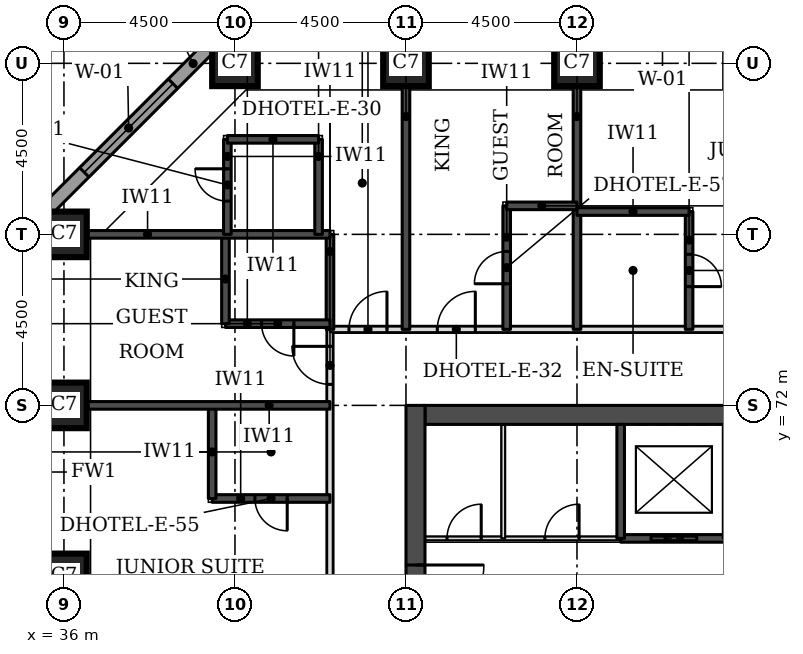
"""IFC4 building model, lengths in metres.
Left out: names, types, materials, properties, quantities, classifications, styles, units other than length and angle.
Written with IfcOpenShell. Run it as: python <this file> out.ifc"""

import sys

from ifc_helpers import new_model, si_unit, direction, frame, frame_2d, origin, origin_2d, place, context, subcontext, project, spatial, rectangle, extrude, element, fill, save


model = new_model("IFC4")
c1 = context("Model", 3, precision=1e-05, world=origin(), true_north=direction((0.0, 1.0)))
c2 = subcontext(c1, "Body", "Model", "MODEL_VIEW")
j1 = project(units=[si_unit("LENGTHUNIT", "METRE"), si_unit("PLANEANGLEUNIT", "RADIAN")], contexts=[c1])
p1 = place(None, origin())
s1 = spatial("IfcSite", under=j1, at=p1, CompositionType="ELEMENT")
p2 = place(p1, origin())
s2 = spatial("IfcBuilding", under=s1, at=p2, CompositionType="ELEMENT")
p3 = place(p2, frame((0.0, 0.0, 39.6)))
s3 = spatial("IfcBuildingStorey", under=s2, at=p3, CompositionType="ELEMENT", Elevation=39.6)
for number, where, z_axis, x_axis in (
    (1, (36.0, 67.5, 0.0), (0.0, 0.0, 1.0), (1.0, 0.0, 0.0)),
    (2, (36.0, 72.0, 0.0), (0.0, 0.0, 1.0), (1.0, 0.0, 0.0)),
    (3, (36.0, 76.5, 0.0), (0.0, 0.0, 1.0), (1.0, 0.0, 0.0)),
    (4, (40.5, 81.0, 0.0), (0.0, 0.0, 1.0), (1.0, 0.0, 0.0)),
    (5, (45.0, 81.0, 0.0), (0.0, 0.0, 1.0), (1.0, 0.0, 0.0)),
    (6, (49.5, 81.0, 0.0), (0.0, 0.0, 1.0), (1.0, 0.0, 0.0)),
):
    element("IfcColumn", number, at=place(p3, frame(where, z_axis=z_axis, x_axis=x_axis)), inside=s3, PredefinedType="COLUMN", context=c2, shape_type="SweptSolid", body=[
        extrude(rectangle(XDim=1.2, YDim=1.2, at=origin_2d()), origin(), (0.0, 0.0, 1.0), 3.3),
    ])
p4 = place(p3, frame((45.5, 71.75, 0.0), z_axis=(0.0, 0.0, 1.0), x_axis=(1.0, 0.0, 0.0)))
e7 = element("IfcWall", 7, at=p4, inside=s3, PredefinedType="SHEAR", context=c2, shape_type="SweptSolid", body=[
    extrude(rectangle(XDim=21.5, YDim=0.5, at=frame_2d((10.75, 0.0))), origin(), (0.0, 0.0, 1.0), 3.3),
])
p5 = place(p3, frame((45.25, 49.5, 0.0), z_axis=(0.0, 0.0, 1.0), x_axis=(0.0, 1.0, 0.0)))
e8 = element("IfcWall", 8, at=p5, inside=s3, PredefinedType="SHEAR", context=c2, shape_type="SweptSolid", body=[
    extrude(rectangle(XDim=22.5, YDim=0.5, at=frame_2d((11.25, 0.0))), origin(), (0.0, 0.0, 1.0), 3.3),
])
p6 = place(p5, frame((4.2, 0.0, 0.0)))
e9 = element("IfcOpeningElement", 9, at=p6, cuts=e8, PredefinedType="OPENING", context=c2, shape_type="SweptSolid", body=[
    extrude(rectangle(XDim=1.8, YDim=2.1, at=frame_2d((0.9, 1.05))), frame((0.0, 0.26, 0.0), z_axis=(0.0, -1.0, 0.0), x_axis=(1.0, 0.0, 0.0)), (0.0, 0.0, 1.0), 0.52),
])
p7 = place(p5, frame((6.9, 0.0, 0.0)))
e10 = element("IfcOpeningElement", 10, at=p7, cuts=e8, PredefinedType="OPENING", context=c2, shape_type="SweptSolid", body=[
    extrude(rectangle(XDim=1.1, YDim=2.1, at=frame_2d((0.55, 1.05))), frame((0.0, 0.26, 0.0), z_axis=(0.0, -1.0, 0.0), x_axis=(1.0, 0.0, 0.0)), (0.0, 0.0, 1.0), 0.52),
])
p8 = place(p5, frame((13.6, 0.0, 0.0)))
e11 = element("IfcOpeningElement", 11, at=p8, cuts=e8, PredefinedType="OPENING", context=c2, shape_type="SweptSolid", body=[
    extrude(rectangle(XDim=1.1, YDim=2.1, at=frame_2d((0.55, 1.05))), frame((0.0, 0.26, 0.0), z_axis=(0.0, -1.0, 0.0), x_axis=(1.0, 0.0, 0.0)), (0.0, 0.0, 1.0), 0.52),
])
p9 = place(p5, frame((16.5, 0.0, 0.0)))
e12 = element("IfcOpeningElement", 12, at=p9, cuts=e8, PredefinedType="OPENING", context=c2, shape_type="SweptSolid", body=[
    extrude(rectangle(XDim=1.8, YDim=2.1, at=frame_2d((0.9, 1.05))), frame((0.0, 0.26, 0.0), z_axis=(0.0, -1.0, 0.0), x_axis=(1.0, 0.0, 0.0)), (0.0, 0.0, 1.0), 0.52),
])
p10 = place(p3, frame((40.23, 81.826, 0.0), z_axis=(0.0, 0.0, 1.0), x_axis=(-0.707106781187, -0.707106781187, 0.0)))
e13 = element("IfcWall", 13, at=p10, inside=s3, PredefinedType="STANDARD", context=c2, shape_type="SweptSolid", body=[
    extrude(rectangle(XDim=7.151, YDim=0.35, at=frame_2d((3.576, 0.0))), origin(), (0.0, 0.0, 1.0), 3.055),
])
p11 = place(p10, frame((1.926, 0.0, 0.8)))
e14 = element("IfcOpeningElement", 14, at=p11, cuts=e13, PredefinedType="OPENING", context=c2, shape_type="SweptSolid", body=[
    extrude(rectangle(XDim=3.3, YDim=1.5, at=frame_2d((1.65, 0.75))), frame((0.0, 0.185, 0.0), z_axis=(0.0, -1.0, 0.0), x_axis=(1.0, 0.0, 0.0)), (0.0, 0.0, 1.0), 0.37),
])
p12 = place(p3, frame((43.0, 57.35, 0.0), z_axis=(0.0, 0.0, 1.0), x_axis=(0.0, 1.0, 0.0)))
e15 = element("IfcWall", 15, at=p12, inside=s3, PredefinedType="PARTITIONING", context=c2, shape_type="SweptSolid", body=[
    extrude(rectangle(XDim=16.65, YDim=0.15, at=frame_2d((8.325, 0.0))), origin(), (0.0, 0.0, 1.0), 3.08),
])
p13 = place(p12, frame((8.425, 0.0, 0.0)))
e16 = element("IfcOpeningElement", 16, at=p13, cuts=e15, PredefinedType="OPENING", context=c2, shape_type="SweptSolid", body=[
    extrude(rectangle(XDim=1.0, YDim=2.1, at=frame_2d((0.5, 1.05))), frame((0.0, 0.085, 0.0), z_axis=(0.0, -1.0, 0.0), x_axis=(1.0, 0.0, 0.0)), (0.0, 0.0, 1.0), 0.17),
])
p14 = place(p12, frame((15.203, 0.0, 0.0)))
e17 = element("IfcOpeningElement", 17, at=p14, cuts=e15, PredefinedType="OPENING", context=c2, shape_type="SweptSolid", body=[
    extrude(rectangle(XDim=1.0, YDim=2.1, at=frame_2d((0.5, 1.05))), frame((0.0, 0.085, 0.0), z_axis=(0.0, -1.0, 0.0), x_axis=(1.0, 0.0, 0.0)), (0.0, 0.0, 1.0), 0.17),
])
p15 = place(p3, frame((43.0, 74.0, 0.0), z_axis=(0.0, 0.0, 1.0), x_axis=(1.0, 0.0, 0.0)))
e18 = element("IfcWall", 18, at=p15, inside=s3, PredefinedType="PARTITIONING", context=c2, shape_type="SweptSolid", body=[
    extrude(rectangle(XDim=26.5, YDim=0.15, at=frame_2d((13.25, 0.0))), origin(), (0.0, 0.0, 1.0), 3.08),
])
p16 = place(p15, frame((2.825, 0.0, 0.0)))
e19 = element("IfcOpeningElement", 19, at=p16, cuts=e18, PredefinedType="OPENING", context=c2, shape_type="SweptSolid", body=[
    extrude(rectangle(XDim=1.0, YDim=2.1, at=frame_2d((0.5, 1.05))), frame((0.0, 0.085, 0.0), z_axis=(0.0, -1.0, 0.0), x_axis=(1.0, 0.0, 0.0)), (0.0, 0.0, 1.0), 0.17),
])
p17 = place(p15, frame((11.975, 0.0, 0.0)))
e20 = element("IfcOpeningElement", 20, at=p17, cuts=e18, PredefinedType="OPENING", context=c2, shape_type="SweptSolid", body=[
    extrude(rectangle(XDim=1.0, YDim=2.1, at=frame_2d((0.5, 1.05))), frame((0.0, 0.085, 0.0), z_axis=(0.0, -1.0, 0.0), x_axis=(1.0, 0.0, 0.0)), (0.0, 0.0, 1.0), 0.17),
])
p18 = place(p15, frame((18.275, 0.0, 0.0)))
e21 = element("IfcOpeningElement", 21, at=p18, cuts=e18, PredefinedType="OPENING", context=c2, shape_type="SweptSolid", body=[
    extrude(rectangle(XDim=1.0, YDim=2.1, at=frame_2d((0.5, 1.05))), frame((0.0, 0.085, 0.0), z_axis=(0.0, -1.0, 0.0), x_axis=(1.0, 0.0, 0.0)), (0.0, 0.0, 1.0), 0.17),
])
p19 = place(p15, frame((0.5, 0.0, 0.0)))
e22 = element("IfcOpeningElement", 22, at=p19, cuts=e18, PredefinedType="OPENING", context=c2, shape_type="SweptSolid", body=[
    extrude(rectangle(XDim=1.0, YDim=2.1, at=frame_2d((0.5, 1.05))), frame((0.0, 0.085, 0.0), z_axis=(0.0, -1.0, 0.0), x_axis=(1.0, 0.0, 0.0)), (0.0, 0.0, 1.0), 0.17),
])
p20 = place(p15, frame((25.0, 0.0, 0.0)))
e23 = element("IfcOpeningElement", 23, at=p20, cuts=e18, PredefinedType="OPENING", context=c2, shape_type="SweptSolid", body=[
    extrude(rectangle(XDim=1.0, YDim=2.1, at=frame_2d((0.5, 1.05))), frame((0.0, 0.085, 0.0), z_axis=(0.0, -1.0, 0.0), x_axis=(1.0, 0.0, 0.0)), (0.0, 0.0, 1.0), 0.17),
])
p21 = place(p3, frame((39.9, 69.55, 0.0), z_axis=(0.0, 0.0, 1.0), x_axis=(1.0, 0.0, 0.0)))
e24 = element("IfcWall", 24, at=p21, inside=s3, PredefinedType="SOLIDWALL", context=c2, shape_type="SweptSolid", body=[
    extrude(rectangle(XDim=3.1, YDim=0.2, at=frame_2d((1.55, 0.0))), origin(), (0.0, 0.0, 1.0), 3.08),
])
p22 = place(p21, frame((1.125, 0.0, 0.0)))
e25 = element("IfcOpeningElement", 25, at=p22, cuts=e24, PredefinedType="OPENING", context=c2, shape_type="SweptSolid", body=[
    extrude(rectangle(XDim=0.85, YDim=2.1, at=frame_2d((0.425, 1.05))), frame((0.0, 0.11, 0.0), z_axis=(0.0, -1.0, 0.0), x_axis=(1.0, 0.0, 0.0)), (0.0, 0.0, 1.0), 0.22),
])
p23 = place(p3, frame((39.9, 69.55, 0.0), z_axis=(0.0, 0.0, 1.0), x_axis=(0.0, 1.0, 0.0)))
e26 = element("IfcWall", 26, at=p23, inside=s3, PredefinedType="SOLIDWALL", context=c2, shape_type="SweptSolid", body=[
    extrude(rectangle(XDim=2.45, YDim=0.2, at=frame_2d((1.225, 0.0))), origin(), (0.0, 0.0, 1.0), 3.08),
])
p24 = place(p3, frame((36.6, 72.0, 0.0), z_axis=(0.0, 0.0, 1.0), x_axis=(1.0, 0.0, 0.0)))
e27 = element("IfcWall", 27, at=p24, inside=s3, PredefinedType="SOLIDWALL", context=c2, shape_type="SweptSolid", body=[
    extrude(rectangle(XDim=6.4, YDim=0.2, at=frame_2d((3.2, 0.0))), origin(), (0.0, 0.0, 1.0), 3.08),
])
p25 = place(p3, frame((43.0, 74.0, 0.0), z_axis=(0.0, 0.0, 1.0), x_axis=(0.0, 1.0, 0.0)))
e28 = element("IfcWall", 28, at=p25, inside=s3, PredefinedType="SOLIDWALL", context=c2, shape_type="SweptSolid", body=[
    extrude(rectangle(XDim=2.5, YDim=0.2, at=frame_2d((1.25, 0.0))), origin(), (0.0, 0.0, 1.0), 3.08),
])
p26 = place(p3, frame((45.0, 74.0, 0.0), z_axis=(0.0, 0.0, 1.0), x_axis=(0.0, 1.0, 0.0)))
e29 = element("IfcWall", 29, at=p26, inside=s3, PredefinedType="SOLIDWALL", context=c2, shape_type="SweptSolid", body=[
    extrude(rectangle(XDim=6.4, YDim=0.2, at=frame_2d((3.2, 0.0))), origin(), (0.0, 0.0, 1.0), 3.08),
])
p27 = place(p3, frame((47.65, 74.0, 0.0), z_axis=(0.0, 0.0, 1.0), x_axis=(0.0, 1.0, 0.0)))
e30 = element("IfcWall", 30, at=p27, inside=s3, PredefinedType="SOLIDWALL", context=c2, shape_type="SweptSolid", body=[
    extrude(rectangle(XDim=3.25, YDim=0.2, at=frame_2d((1.625, 0.0))), origin(), (0.0, 0.0, 1.0), 3.08),
])
p28 = place(p27, frame((1.2, 0.0, 0.0)))
e31 = element("IfcOpeningElement", 31, at=p28, cuts=e30, PredefinedType="OPENING", context=c2, shape_type="SweptSolid", body=[
    extrude(rectangle(XDim=0.85, YDim=2.1, at=frame_2d((0.425, 1.05))), frame((0.0, 0.11, 0.0), z_axis=(0.0, -1.0, 0.0), x_axis=(1.0, 0.0, 0.0)), (0.0, 0.0, 1.0), 0.22),
])
p29 = place(p3, frame((49.5, 74.0, 0.0), z_axis=(0.0, 0.0, 1.0), x_axis=(0.0, 1.0, 0.0)))
e32 = element("IfcWall", 32, at=p29, inside=s3, PredefinedType="SOLIDWALL", context=c2, shape_type="SweptSolid", body=[
    extrude(rectangle(XDim=6.4, YDim=0.2, at=frame_2d((3.2, 0.0))), origin(), (0.0, 0.0, 1.0), 3.08),
])
p30 = place(p3, frame((52.45, 74.0, 0.0), z_axis=(0.0, 0.0, 1.0), x_axis=(0.0, 1.0, 0.0)))
e33 = element("IfcWall", 33, at=p30, inside=s3, PredefinedType="SOLIDWALL", context=c2, shape_type="SweptSolid", body=[
    extrude(rectangle(XDim=3.1, YDim=0.2, at=frame_2d((1.55, 0.0))), origin(), (0.0, 0.0, 1.0), 3.08),
])
p31 = place(p30, frame((1.125, 0.0, 0.0)))
e34 = element("IfcOpeningElement", 34, at=p31, cuts=e33, PredefinedType="OPENING", context=c2, shape_type="SweptSolid", body=[
    extrude(rectangle(XDim=0.85, YDim=2.1, at=frame_2d((0.425, 1.05))), frame((0.0, 0.11, 0.0), z_axis=(0.0, -1.0, 0.0), x_axis=(1.0, 0.0, 0.0)), (0.0, 0.0, 1.0), 0.22),
])
p32 = place(p3, frame((40.25, 74.15, 0.0), z_axis=(0.0, 0.0, 1.0), x_axis=(1.0, 0.0, 0.0)))
e35 = element("IfcWall", 35, at=p32, inside=s3, PredefinedType="SOLIDWALL", context=c2, shape_type="SweptSolid", body=[
    extrude(rectangle(XDim=2.75, YDim=0.2, at=frame_2d((1.375, 0.0))), origin(), (0.0, 0.0, 1.0), 3.08),
])
p33 = place(p32, frame((0.95, 0.0, 0.0)))
e36 = element("IfcOpeningElement", 36, at=p33, cuts=e35, PredefinedType="OPENING", context=c2, shape_type="SweptSolid", body=[
    extrude(rectangle(XDim=0.85, YDim=2.1, at=frame_2d((0.425, 1.05))), frame((0.0, 0.11, 0.0), z_axis=(0.0, -1.0, 0.0), x_axis=(1.0, 0.0, 0.0)), (0.0, 0.0, 1.0), 0.22),
])
p34 = place(p3, frame((40.25, 74.15, 0.0), z_axis=(0.0, 0.0, 1.0), x_axis=(0.0, 1.0, 0.0)))
e37 = element("IfcWall", 37, at=p34, inside=s3, PredefinedType="SOLIDWALL", context=c2, shape_type="SweptSolid", body=[
    extrude(rectangle(XDim=2.35, YDim=0.2, at=frame_2d((1.175, 0.0))), origin(), (0.0, 0.0, 1.0), 3.08),
])
p35 = place(p3, frame((36.6, 76.5, 0.0), z_axis=(0.0, 0.0, 1.0), x_axis=(1.0, 0.0, 0.0)))
e38 = element("IfcWall", 38, at=p35, inside=s3, PredefinedType="SOLIDWALL", context=c2, shape_type="SweptSolid", body=[
    extrude(rectangle(XDim=6.4, YDim=0.2, at=frame_2d((3.2, 0.0))), origin(), (0.0, 0.0, 1.0), 3.08),
])
p36 = place(p3, frame((40.3, 76.5, 0.0), z_axis=(0.0, 0.0, 1.0), x_axis=(0.0, 1.0, 0.0)))
e39 = element("IfcWall", 39, at=p36, inside=s3, PredefinedType="SOLIDWALL", context=c2, shape_type="SweptSolid", body=[
    extrude(rectangle(XDim=2.5, YDim=0.2, at=frame_2d((1.25, 0.0))), origin(), (0.0, 0.0, 1.0), 3.08),
])
p37 = place(p36, frame((0.875, 0.0, 0.0)))
e40 = element("IfcOpeningElement", 40, at=p37, cuts=e39, PredefinedType="OPENING", context=c2, shape_type="SweptSolid", body=[
    extrude(rectangle(XDim=0.85, YDim=2.1, at=frame_2d((0.425, 1.05))), frame((0.0, 0.11, 0.0), z_axis=(0.0, -1.0, 0.0), x_axis=(1.0, 0.0, 0.0)), (0.0, 0.0, 1.0), 0.22),
])
p38 = place(p3, frame((42.7, 76.5, 0.0), z_axis=(0.0, 0.0, 1.0), x_axis=(0.0, 1.0, 0.0)))
e41 = element("IfcWall", 41, at=p38, inside=s3, PredefinedType="SOLIDWALL", context=c2, shape_type="SweptSolid", body=[
    extrude(rectangle(XDim=2.5, YDim=0.2, at=frame_2d((1.25, 0.0))), origin(), (0.0, 0.0, 1.0), 3.08),
])
p39 = place(p3, frame((49.5, 77.1, 0.0), z_axis=(0.0, 0.0, 1.0), x_axis=(1.0, 0.0, 0.0)))
e42 = element("IfcWall", 42, at=p39, inside=s3, PredefinedType="SOLIDWALL", context=c2, shape_type="SweptSolid", body=[
    extrude(rectangle(XDim=2.95, YDim=0.2, at=frame_2d((1.475, 0.0))), origin(), (0.0, 0.0, 1.0), 3.08),
])
p40 = place(p3, frame((47.65, 77.25, 0.0), z_axis=(0.0, 0.0, 1.0), x_axis=(1.0, 0.0, 0.0)))
e43 = element("IfcWall", 43, at=p40, inside=s3, PredefinedType="SOLIDWALL", context=c2, shape_type="SweptSolid", body=[
    extrude(rectangle(XDim=1.85, YDim=0.2, at=frame_2d((0.925, 0.0))), origin(), (0.0, 0.0, 1.0), 3.08),
])
p41 = place(p3, frame((40.3, 79.0, 0.0), z_axis=(0.0, 0.0, 1.0), x_axis=(1.0, 0.0, 0.0)))
e44 = element("IfcWall", 44, at=p41, inside=s3, PredefinedType="SOLIDWALL", context=c2, shape_type="SweptSolid", body=[
    extrude(rectangle(XDim=2.4, YDim=0.2, at=frame_2d((1.2, 0.0))), origin(), (0.0, 0.0, 1.0), 3.08),
])
p42 = place(p3, frame((45.5, 68.5, 0.0), z_axis=(0.0, 0.0, 1.0), x_axis=(1.0, 0.0, 0.0)))
e45 = element("IfcWall", 45, at=p42, inside=s3, PredefinedType="PARTITIONING", context=c2, shape_type="SweptSolid", body=[
    extrude(rectangle(XDim=5.15, YDim=0.1, at=frame_2d((2.575, 0.0))), origin(), (0.0, 0.0, 1.0), 3.08),
])
p43 = place(p42, frame((0.58, 0.0, 0.0)))
e46 = element("IfcOpeningElement", 46, at=p43, cuts=e45, PredefinedType="OPENING", context=c2, shape_type="SweptSolid", body=[
    extrude(rectangle(XDim=0.9, YDim=2.1, at=frame_2d((0.45, 1.05))), frame((0.0, 0.06, 0.0), z_axis=(0.0, -1.0, 0.0), x_axis=(1.0, 0.0, 0.0)), (0.0, 0.0, 1.0), 0.12),
])
p44 = place(p42, frame((3.155, 0.0, 0.0)))
e47 = element("IfcOpeningElement", 47, at=p44, cuts=e45, PredefinedType="OPENING", context=c2, shape_type="SweptSolid", body=[
    extrude(rectangle(XDim=0.9, YDim=2.1, at=frame_2d((0.45, 1.05))), frame((0.0, 0.06, 0.0), z_axis=(0.0, -1.0, 0.0), x_axis=(1.0, 0.0, 0.0)), (0.0, 0.0, 1.0), 0.12),
])
p45 = place(p3, frame((50.65, 68.5, 0.0), z_axis=(0.0, 0.0, 1.0), x_axis=(1.0, 0.0, 0.0)))
e48 = element("IfcWall", 48, at=p45, inside=s3, PredefinedType="SOLIDWALL", context=c2, shape_type="SweptSolid", body=[
    extrude(rectangle(XDim=11.2, YDim=0.2, at=frame_2d((5.6, 0.0))), origin(), (0.0, 0.0, 1.0), 3.08),
])
p46 = place(p45, frame((0.8, 0.0, 0.0)))
e49 = element("IfcOpeningElement", 49, at=p46, cuts=e48, PredefinedType="OPENING", context=c2, shape_type="SweptSolid", body=[
    extrude(rectangle(XDim=1.2, YDim=2.1, at=frame_2d((0.6, 1.05))), frame((0.0, 0.11, 0.0), z_axis=(0.0, -1.0, 0.0), x_axis=(1.0, 0.0, 0.0)), (0.0, 0.0, 1.0), 0.22),
])
p47 = place(p45, frame((3.6, 0.0, 0.0)))
e50 = element("IfcOpeningElement", 50, at=p47, cuts=e48, PredefinedType="OPENING", context=c2, shape_type="SweptSolid", body=[
    extrude(rectangle(XDim=1.2, YDim=2.1, at=frame_2d((0.6, 1.05))), frame((0.0, 0.11, 0.0), z_axis=(0.0, -1.0, 0.0), x_axis=(1.0, 0.0, 0.0)), (0.0, 0.0, 1.0), 0.22),
])
p48 = place(p45, frame((6.4, 0.0, 0.0)))
e51 = element("IfcOpeningElement", 51, at=p48, cuts=e48, PredefinedType="OPENING", context=c2, shape_type="SweptSolid", body=[
    extrude(rectangle(XDim=1.2, YDim=2.1, at=frame_2d((0.6, 1.05))), frame((0.0, 0.11, 0.0), z_axis=(0.0, -1.0, 0.0), x_axis=(1.0, 0.0, 0.0)), (0.0, 0.0, 1.0), 0.22),
])
p49 = place(p45, frame((9.2, 0.0, 0.0)))
e52 = element("IfcOpeningElement", 52, at=p49, cuts=e48, PredefinedType="OPENING", context=c2, shape_type="SweptSolid", body=[
    extrude(rectangle(XDim=1.2, YDim=2.1, at=frame_2d((0.6, 1.05))), frame((0.0, 0.11, 0.0), z_axis=(0.0, -1.0, 0.0), x_axis=(1.0, 0.0, 0.0)), (0.0, 0.0, 1.0), 0.22),
])
p50 = place(p3, frame((47.56, 68.5, 0.0), z_axis=(0.0, 0.0, 1.0), x_axis=(0.0, 1.0, 0.0)))
e53 = element("IfcWall", 53, at=p50, inside=s3, PredefinedType="PARTITIONING", context=c2, shape_type="SweptSolid", body=[
    extrude(rectangle(XDim=3.0, YDim=0.1, at=frame_2d((1.5, 0.0))), origin(), (0.0, 0.0, 1.0), 3.08),
])
for number, where, z_axis, x_axis in (
    (54, (50.65, 68.5, 0.0), (0.0, 0.0, 1.0), (0.0, 1.0, 0.0)),
    (55, (53.45, 68.5, 0.0), (0.0, 0.0, 1.0), (0.0, 1.0, 0.0)),
):
    element("IfcWall", number, at=place(p3, frame(where, z_axis=z_axis, x_axis=x_axis)), inside=s3, PredefinedType="SOLIDWALL", context=c2, shape_type="SweptSolid", body=[
        extrude(rectangle(XDim=3.0, YDim=0.2, at=frame_2d((1.5, 0.0))), origin(), (0.0, 0.0, 1.0), 3.08),
    ])
p51 = place(p11, origin())
e56 = element("IfcWindow", 56, at=p51, inside=s3, PartitioningType="SINGLE_PANEL", PredefinedType="WINDOW", context=c2, shape_type="SweptSolid", body=[
    extrude(rectangle(XDim=3.3, YDim=1.5, at=frame_2d((1.65, 0.75))), frame((0.0, 0.085, 0.0), z_axis=(0.0, -1.0, 0.0), x_axis=(1.0, 0.0, 0.0)), (0.0, 0.0, 1.0), 0.06),
])
fill(e14, e56)
p52 = place(p22, frame((0.85, 0.0, 0.0), z_axis=(0.0, 0.0, 1.0), x_axis=(-1.0, 0.0, 0.0)))
e57 = element("IfcDoor", 57, at=p52, inside=s3, OperationType="SINGLE_SWING_LEFT", PredefinedType="DOOR", context=c2, shape_type="SweptSolid", body=[
    extrude(rectangle(XDim=0.85, YDim=2.1, at=frame_2d((0.425, 1.05))), frame((0.0, 0.025, 0.0), z_axis=(0.0, -1.0, 0.0), x_axis=(1.0, 0.0, 0.0)), (0.0, 0.0, 1.0), 0.05),
])
fill(e25, e57)
p53 = place(p14, origin())
e58 = element("IfcDoor", 58, at=p53, inside=s3, OperationType="SINGLE_SWING_RIGHT", PredefinedType="DOOR", context=c2, shape_type="SweptSolid", body=[
    extrude(rectangle(XDim=1.0, YDim=2.1, at=frame_2d((0.5, 1.05))), frame((0.0, 0.025, 0.0), z_axis=(0.0, -1.0, 0.0), x_axis=(1.0, 0.0, 0.0)), (0.0, 0.0, 1.0), 0.05),
])
fill(e17, e58)
p54 = place(p33, frame((0.85, 0.0, 0.0), z_axis=(0.0, 0.0, 1.0), x_axis=(-1.0, 0.0, 0.0)))
e59 = element("IfcDoor", 59, at=p54, inside=s3, OperationType="SINGLE_SWING_LEFT", PredefinedType="DOOR", context=c2, shape_type="SweptSolid", body=[
    extrude(rectangle(XDim=0.85, YDim=2.1, at=frame_2d((0.425, 1.05))), frame((0.0, 0.025, 0.0), z_axis=(0.0, -1.0, 0.0), x_axis=(1.0, 0.0, 0.0)), (0.0, 0.0, 1.0), 0.05),
])
fill(e36, e59)
p55 = place(p16, origin())
e60 = element("IfcDoor", 60, at=p55, inside=s3, OperationType="SINGLE_SWING_RIGHT", PredefinedType="DOOR", context=c2, shape_type="SweptSolid", body=[
    extrude(rectangle(XDim=1.0, YDim=2.1, at=frame_2d((0.5, 1.05))), frame((0.0, 0.025, 0.0), z_axis=(0.0, -1.0, 0.0), x_axis=(1.0, 0.0, 0.0)), (0.0, 0.0, 1.0), 0.05),
])
fill(e19, e60)
p56 = place(p28, origin())
e61 = element("IfcDoor", 61, at=p56, inside=s3, OperationType="SINGLE_SWING_LEFT", PredefinedType="DOOR", context=c2, shape_type="SweptSolid", body=[
    extrude(rectangle(XDim=0.85, YDim=2.1, at=frame_2d((0.425, 1.05))), frame((0.0, 0.025, 0.0), z_axis=(0.0, -1.0, 0.0), x_axis=(1.0, 0.0, 0.0)), (0.0, 0.0, 1.0), 0.05),
])
fill(e31, e61)
p57 = place(p31, frame((0.85, 0.0, 0.0), z_axis=(0.0, 0.0, 1.0), x_axis=(-1.0, 0.0, 0.0)))
e62 = element("IfcDoor", 62, at=p57, inside=s3, OperationType="SINGLE_SWING_RIGHT", PredefinedType="DOOR", context=c2, shape_type="SweptSolid", body=[
    extrude(rectangle(XDim=0.85, YDim=2.1, at=frame_2d((0.425, 1.05))), frame((0.0, 0.025, 0.0), z_axis=(0.0, -1.0, 0.0), x_axis=(1.0, 0.0, 0.0)), (0.0, 0.0, 1.0), 0.05),
])
fill(e34, e62)
p58 = place(p19, origin())
e63 = element("IfcDoor", 63, at=p58, inside=s3, OperationType="SINGLE_SWING_RIGHT", PredefinedType="DOOR", context=c2, shape_type="SweptSolid", body=[
    extrude(rectangle(XDim=1.0, YDim=2.1, at=frame_2d((0.5, 1.05))), frame((0.0, 0.025, 0.0), z_axis=(0.0, -1.0, 0.0), x_axis=(1.0, 0.0, 0.0)), (0.0, 0.0, 1.0), 0.05),
])
fill(e22, e63)
p59 = place(p37, origin())
e64 = element("IfcDoor", 64, at=p59, inside=s3, OperationType="SINGLE_SWING_RIGHT", PredefinedType="DOOR", context=c2, shape_type="SweptSolid", body=[
    extrude(rectangle(XDim=0.85, YDim=2.1, at=frame_2d((0.425, 1.05))), frame((0.0, 0.025, 0.0), z_axis=(0.0, -1.0, 0.0), x_axis=(1.0, 0.0, 0.0)), (0.0, 0.0, 1.0), 0.05),
])
fill(e40, e64)
p60 = place(p46, origin())
e65 = element("IfcDoor", 65, at=p60, inside=s3, OperationType="DOUBLE_DOOR_SLIDING", PredefinedType="DOOR", context=c2, shape_type="SweptSolid", body=[
    extrude(rectangle(XDim=1.2, YDim=2.1, at=frame_2d((0.6, 1.05))), frame((0.0, 0.025, 0.0), z_axis=(0.0, -1.0, 0.0), x_axis=(1.0, 0.0, 0.0)), (0.0, 0.0, 1.0), 0.05),
])
fill(e49, e65)
p61 = place(p9, frame((1.8, 0.0, 0.0), z_axis=(0.0, 0.0, 1.0), x_axis=(-1.0, 0.0, 0.0)))
e66 = element("IfcDoor", 66, at=p61, inside=s3, OperationType="SINGLE_SWING_LEFT", PredefinedType="DOOR", context=c2, shape_type="SweptSolid", body=[
    extrude(rectangle(XDim=1.8, YDim=2.1, at=frame_2d((0.9, 1.05))), frame((0.0, 0.025, 0.0), z_axis=(0.0, -1.0, 0.0), x_axis=(1.0, 0.0, 0.0)), (0.0, 0.0, 1.0), 0.05),
])
fill(e12, e66)
p62 = place(p43, origin())
e67 = element("IfcDoor", 67, at=p62, inside=s3, OperationType="SINGLE_SWING_RIGHT", PredefinedType="DOOR", context=c2, shape_type="SweptSolid", body=[
    extrude(rectangle(XDim=0.9, YDim=2.1, at=frame_2d((0.45, 1.05))), frame((0.0, 0.025, 0.0), z_axis=(0.0, -1.0, 0.0), x_axis=(1.0, 0.0, 0.0)), (0.0, 0.0, 1.0), 0.05),
])
fill(e46, e67)
p63 = place(p44, origin())
e68 = element("IfcDoor", 68, at=p63, inside=s3, OperationType="SINGLE_SWING_RIGHT", PredefinedType="DOOR", context=c2, shape_type="SweptSolid", body=[
    extrude(rectangle(XDim=0.9, YDim=2.1, at=frame_2d((0.45, 1.05))), frame((0.0, 0.025, 0.0), z_axis=(0.0, -1.0, 0.0), x_axis=(1.0, 0.0, 0.0)), (0.0, 0.0, 1.0), 0.05),
])
fill(e47, e68)
save(model, sys.argv[1])
